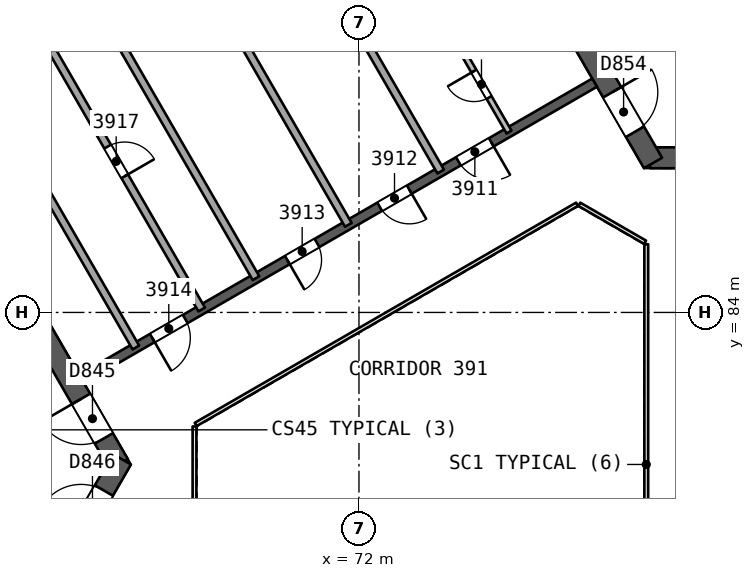
"""IFC4 building model, lengths in metres.
Left out: names, types, materials, properties, quantities, classifications, styles, units other than length and angle.
Written with IfcOpenShell. Run it as: python <this file> out.ifc"""

import sys

from ifc_helpers import new_model, si_unit, direction, frame, frame_2d, origin, place, context, subcontext, project, spatial, rectangle, extrude, element, fill, save


model = new_model("IFC4")
c1 = context("Model", 3, precision=1e-05, world=origin(), true_north=direction((0.0, 1.0)))
c2 = subcontext(c1, "Body", "Model", "MODEL_VIEW")
j1 = project(units=[si_unit("LENGTHUNIT", "METRE"), si_unit("PLANEANGLEUNIT", "RADIAN")], contexts=[c1])
p1 = place(None, origin())
s1 = spatial("IfcSite", under=j1, at=p1, CompositionType="ELEMENT")
p2 = place(p1, origin())
s2 = spatial("IfcBuilding", under=s1, at=p2, CompositionType="ELEMENT")
p3 = place(p2, frame((0.0, 0.0, 163.7)))
s3 = spatial("IfcBuildingStorey", under=s2, at=p3, CompositionType="ELEMENT", Elevation=163.7)
p4 = place(p3, frame((65.682, 80.0, 0.0), z_axis=(0.0, 0.0, 1.0), x_axis=(-0.500000202252, 0.866025287014, 0.0)))
e1 = element("IfcWall", 1, at=p4, inside=s3, PredefinedType="SHEAR", context=c2, shape_type="SweptSolid", body=[
    extrude(rectangle(XDim=10.221, YDim=0.55, at=frame_2d((5.111, 0.0))), origin(), (0.0, 0.0, 1.0), 3.7),
])
p5 = place(p4, frame((0.791, 0.0, 0.0)))
e2 = element("IfcOpeningElement", 2, at=p5, cuts=e1, PredefinedType="OPENING", context=c2, shape_type="SweptSolid", body=[
    extrude(rectangle(XDim=1.2, YDim=2.1, at=frame_2d((0.6, 1.05))), frame((0.0, 0.286, 0.0), z_axis=(0.0, -1.0, 0.0), x_axis=(1.0, 0.0, 0.0)), (0.0, 0.0, 1.0), 0.571),
])
p6 = place(p3, frame((60.709, 71.386, 0.0), z_axis=(0.0, 0.0, 1.0), x_axis=(0.500015938302, 0.866016201606, 0.0)))
e3 = element("IfcWall", 3, at=p6, inside=s3, PredefinedType="SHEAR", context=c2, shape_type="SweptSolid", body=[
    extrude(rectangle(XDim=10.105, YDim=0.55, at=frame_2d((5.053, 0.0))), origin(), (0.0, 0.0, 1.0), 3.7),
])
p7 = place(p6, frame((7.955, 0.0, 0.0)))
e4 = element("IfcOpeningElement", 4, at=p7, cuts=e3, PredefinedType="OPENING", context=c2, shape_type="SweptSolid", body=[
    extrude(rectangle(XDim=1.2, YDim=2.1, at=frame_2d((0.6, 1.05))), frame((0.0, 0.286, 0.0), z_axis=(0.0, -1.0, 0.0), x_axis=(1.0, 0.0, 0.0)), (0.0, 0.0, 1.0), 0.571),
])
p8 = place(p3, frame((79.659, 88.069, 0.0), z_axis=(0.0, 0.0, 1.0), x_axis=(1.0, 0.0, 0.0)))
e5 = element("IfcWall", 5, at=p8, inside=s3, PredefinedType="SHEAR", context=c2, shape_type="SweptSolid", body=[
    extrude(rectangle(XDim=10.221, YDim=0.55, at=frame_2d((5.111, 0.0))), origin(), (0.0, 0.0, 1.0), 3.7),
])
p9 = place(p8, frame((0.791, 0.0, 0.0)))
e6 = element("IfcOpeningElement", 6, at=p9, cuts=e5, PredefinedType="OPENING", context=c2, shape_type="SweptSolid", body=[
    extrude(rectangle(XDim=1.2, YDim=2.1, at=frame_2d((0.6, 1.05))), frame((0.0, 0.286, 0.0), z_axis=(0.0, -1.0, 0.0), x_axis=(1.0, 0.0, 0.0)), (0.0, 0.0, 1.0), 0.571),
])
p10 = place(p3, frame((74.686, 96.683, 0.0), z_axis=(0.0, 0.0, 1.0), x_axis=(0.499997818338, -0.866026663364, 0.0)))
e7 = element("IfcWall", 7, at=p10, inside=s3, PredefinedType="SHEAR", context=c2, shape_type="SweptSolid", body=[
    extrude(rectangle(XDim=10.105, YDim=0.55, at=frame_2d((5.052, 0.0))), origin(), (0.0, 0.0, 1.0), 3.7),
])
p11 = place(p10, frame((7.955, 0.0, 0.0)))
e8 = element("IfcOpeningElement", 8, at=p11, cuts=e7, PredefinedType="OPENING", context=c2, shape_type="SweptSolid", body=[
    extrude(rectangle(XDim=1.2, YDim=2.1, at=frame_2d((0.6, 1.05))), frame((0.0, 0.286, 0.0), z_axis=(0.0, -1.0, 0.0), x_axis=(1.0, 0.0, 0.0)), (0.0, 0.0, 1.0), 0.571),
])
p12 = place(p3, frame((78.2, 90.046, 0.0), z_axis=(0.0, 0.0, 1.0), x_axis=(-0.866026492143, -0.499998114903, 0.0)))
e9 = element("IfcWall", 9, at=p12, inside=s3, PredefinedType="SHEAR", context=c2, shape_type="SweptSolid", body=[
    extrude(rectangle(XDim=15.588, YDim=0.25, at=frame_2d((7.794, 0.0))), origin(), (0.0, 0.0, 1.0), 3.25),
])
p13 = place(p12, frame((3.138, 0.0, 0.0)))
e10 = element("IfcOpeningElement", 10, at=p13, cuts=e9, PredefinedType="OPENING", context=c2, shape_type="SweptSolid", body=[
    extrude(rectangle(XDim=1.0, YDim=2.1, at=frame_2d((0.5, 1.05))), frame((0.0, 0.135, 0.0), z_axis=(0.0, -1.0, 0.0), x_axis=(1.0, 0.0, 0.0)), (0.0, 0.0, 1.0), 0.271),
])
p14 = place(p12, frame((5.629, 0.0, 0.0)))
e11 = element("IfcOpeningElement", 11, at=p14, cuts=e9, PredefinedType="OPENING", context=c2, shape_type="SweptSolid", body=[
    extrude(rectangle(XDim=0.9, YDim=2.1, at=frame_2d((0.45, 1.05))), frame((0.0, 0.135, 0.0), z_axis=(0.0, -1.0, 0.0), x_axis=(1.0, 0.0, 0.0)), (0.0, 0.0, 1.0), 0.271),
])
p15 = place(p12, frame((8.435, 0.0, 0.0)))
e12 = element("IfcOpeningElement", 12, at=p15, cuts=e9, PredefinedType="OPENING", context=c2, shape_type="SweptSolid", body=[
    extrude(rectangle(XDim=0.9, YDim=2.1, at=frame_2d((0.45, 1.05))), frame((0.0, 0.135, 0.0), z_axis=(0.0, -1.0, 0.0), x_axis=(1.0, 0.0, 0.0)), (0.0, 0.0, 1.0), 0.271),
])
p16 = place(p12, frame((12.438, 0.0, 0.0)))
e13 = element("IfcOpeningElement", 13, at=p16, cuts=e9, PredefinedType="OPENING", context=c2, shape_type="SweptSolid", body=[
    extrude(rectangle(XDim=1.0, YDim=2.1, at=frame_2d((0.5, 1.05))), frame((0.0, 0.135, 0.0), z_axis=(0.0, -1.0, 0.0), x_axis=(1.0, 0.0, 0.0)), (0.0, 0.0, 1.0), 0.271),
])
p17 = place(p3, frame((75.948, 88.746, 0.0), z_axis=(0.0, 0.0, 1.0), x_axis=(-0.499987231761, 0.866032775405, 0.0)))
e14 = element("IfcWall", 14, at=p17, inside=s3, PredefinedType="PARTITIONING", context=c2, shape_type="SweptSolid", body=[
    extrude(rectangle(XDim=2.9, YDim=0.15, at=frame_2d((1.45, 0.0))), origin(), (0.0, 0.0, 1.0), 3.25),
])
p18 = place(p17, frame((1.05, 0.0, 0.0)))
e15 = element("IfcOpeningElement", 15, at=p18, cuts=e14, PredefinedType="OPENING", context=c2, shape_type="SweptSolid", body=[
    extrude(rectangle(XDim=0.8, YDim=2.1, at=frame_2d((0.4, 1.05))), frame((0.0, 0.085, 0.0), z_axis=(0.0, -1.0, 0.0), x_axis=(1.0, 0.0, 0.0)), (0.0, 0.0, 1.0), 0.171),
])
for number, where, z_axis, x_axis in (
    (16, (68.374, 97.712, 0.0), (0.0, 0.0, 1.0), (0.5, -0.866, 0.0)),
    (17, (65.944, 96.309, 0.0), (0.0, 0.0, 1.0), (0.5, -0.866, 0.0)),
    (18, (63.514, 94.906, 0.0), (0.0, 0.0, 1.0), (0.5, -0.866, 0.0)),
):
    element("IfcWall", number, at=place(p3, frame(where, z_axis=z_axis, x_axis=x_axis)), inside=s3, PredefinedType="PARTITIONING", context=c2, shape_type="SweptSolid", body=[
        extrude(rectangle(XDim=11.552, YDim=0.2, at=frame_2d((5.776, 0.0))), origin(), (0.0, 0.0, 1.0), 3.25),
    ])
p19 = place(p3, frame((66.129, 83.077, 0.0), z_axis=(0.0, 0.0, 1.0), x_axis=(-0.5000018851, 0.866024315419, 0.0)))
e19 = element("IfcWall", 19, at=p19, inside=s3, PredefinedType="PARTITIONING", context=c2, shape_type="SweptSolid", body=[
    extrude(rectangle(XDim=9.0, YDim=0.2, at=frame_2d((4.5, 0.0))), origin(), (0.0, 0.0, 1.0), 3.25),
])
p20 = place(p3, frame((63.361, 91.871, 0.0), z_axis=(0.0, 0.0, 1.0), x_axis=(0.5000018851, -0.866024315419, 0.0)))
e20 = element("IfcWall", 20, at=p20, inside=s3, PredefinedType="PARTITIONING", context=c2, shape_type="SweptSolid", body=[
    extrude(rectangle(XDim=9.0, YDim=0.2, at=frame_2d((4.5, 0.0))), origin(), (0.0, 0.0, 1.0), 3.25),
])
p21 = place(p20, frame((4.05, 0.0, 0.0)))
e21 = element("IfcOpeningElement", 21, at=p21, cuts=e20, PredefinedType="OPENING", context=c2, shape_type="SweptSolid", body=[
    extrude(rectangle(XDim=0.9, YDim=2.1, at=frame_2d((0.45, 1.05))), frame((0.0, 0.11, 0.0), z_axis=(0.0, -1.0, 0.0), x_axis=(1.0, 0.0, 0.0)), (0.0, 0.0, 1.0), 0.221),
])
p22 = place(p3, frame((42.189, 82.766, 0.0), z_axis=(0.0, 0.0, 1.0), x_axis=(0.866025862562, 0.499999205373, 0.0)))
e22 = element("IfcWall", 22, at=p22, inside=s3, PredefinedType="SOLIDWALL", context=c2, shape_type="SweptSolid", body=[
    extrude(rectangle(XDim=54.064, YDim=0.3, at=frame_2d((27.032, 0.0))), origin(), (0.0, 0.0, 1.0), 3.25),
])
p23 = place(p22, frame((20.688, 0.0, 0.0)))
e23 = element("IfcOpeningElement", 23, at=p23, cuts=e22, PredefinedType="OPENING", context=c2, shape_type="SweptSolid", body=[
    extrude(rectangle(XDim=2.4, YDim=2.4, at=frame_2d((1.2, 1.2))), frame((0.0, 0.161, 0.0), z_axis=(0.0, -1.0, 0.0), x_axis=(1.0, 0.0, 0.0)), (0.0, 0.0, 1.0), 0.321),
])
p24 = place(p22, frame((9.629, 0.0, 0.0)))
e24 = element("IfcOpeningElement", 24, at=p24, cuts=e22, PredefinedType="OPENING", context=c2, shape_type="SweptSolid", body=[
    extrude(rectangle(XDim=2.4, YDim=2.4, at=frame_2d((1.2, 1.2))), frame((0.0, 0.161, 0.0), z_axis=(0.0, -1.0, 0.0), x_axis=(1.0, 0.0, 0.0)), (0.0, 0.0, 1.0), 0.321),
])
p25 = place(p22, frame((40.951, 0.0, 0.0)))
e25 = element("IfcOpeningElement", 25, at=p25, cuts=e22, PredefinedType="OPENING", context=c2, shape_type="SweptSolid", body=[
    extrude(rectangle(XDim=2.4, YDim=2.4, at=frame_2d((1.2, 1.2))), frame((0.0, 0.161, 0.0), z_axis=(0.0, -1.0, 0.0), x_axis=(1.0, 0.0, 0.0)), (0.0, 0.0, 1.0), 0.321),
])
p26 = place(p22, frame((27.847, 0.0, 0.9)))
e26 = element("IfcOpeningElement", 26, at=p26, cuts=e22, PredefinedType="OPENING", context=c2, shape_type="SweptSolid", body=[
    extrude(rectangle(XDim=1.8, YDim=1.5, at=frame_2d((0.9, 0.75))), frame((0.0, 0.161, 0.0), z_axis=(0.0, -1.0, 0.0), x_axis=(1.0, 0.0, 0.0)), (0.0, 0.0, 1.0), 0.321),
])
p27 = place(p22, frame((25.041, 0.0, 0.9)))
e27 = element("IfcOpeningElement", 27, at=p27, cuts=e22, PredefinedType="OPENING", context=c2, shape_type="SweptSolid", body=[
    extrude(rectangle(XDim=1.8, YDim=1.5, at=frame_2d((0.9, 0.75))), frame((0.0, 0.161, 0.0), z_axis=(0.0, -1.0, 0.0), x_axis=(1.0, 0.0, 0.0)), (0.0, 0.0, 1.0), 0.321),
])
p28 = place(p3, frame((86.77, 89.486, 0.0), z_axis=(0.0, 0.0, 1.0), x_axis=(-0.86601811187, 0.500012629753, 0.0)))
e28 = element("IfcWall", 28, at=p28, inside=s3, PredefinedType="SOLIDWALL", context=c2, shape_type="SweptSolid", body=[
    extrude(rectangle(XDim=10.9, YDim=0.2, at=frame_2d((5.45, 0.0))), origin(), (0.0, 0.0, 1.0), 3.25),
])
p29 = place(p28, frame((0.575, 0.0, 0.0)))
e29 = element("IfcOpeningElement", 29, at=p29, cuts=e28, PredefinedType="OPENING", context=c2, shape_type="SweptSolid", body=[
    extrude(rectangle(XDim=1.1, YDim=2.1, at=frame_2d((0.55, 1.05))), frame((0.0, 0.11, 0.0), z_axis=(0.0, -1.0, 0.0), x_axis=(1.0, 0.0, 0.0)), (0.0, 0.0, 1.0), 0.221),
])
p30 = place(p28, frame((2.825, 0.0, 0.0)))
e30 = element("IfcOpeningElement", 30, at=p30, cuts=e28, PredefinedType="OPENING", context=c2, shape_type="SweptSolid", body=[
    extrude(rectangle(XDim=1.1, YDim=2.1, at=frame_2d((0.55, 1.05))), frame((0.0, 0.11, 0.0), z_axis=(0.0, -1.0, 0.0), x_axis=(1.0, 0.0, 0.0)), (0.0, 0.0, 1.0), 0.221),
])
p31 = place(p28, frame((5.075, 0.0, 0.0)))
e31 = element("IfcOpeningElement", 31, at=p31, cuts=e28, PredefinedType="OPENING", context=c2, shape_type="SweptSolid", body=[
    extrude(rectangle(XDim=1.1, YDim=2.1, at=frame_2d((0.55, 1.05))), frame((0.0, 0.11, 0.0), z_axis=(0.0, -1.0, 0.0), x_axis=(1.0, 0.0, 0.0)), (0.0, 0.0, 1.0), 0.221),
])
p32 = place(p28, frame((7.325, 0.0, 0.0)))
e32 = element("IfcOpeningElement", 32, at=p32, cuts=e28, PredefinedType="OPENING", context=c2, shape_type="SweptSolid", body=[
    extrude(rectangle(XDim=1.1, YDim=2.1, at=frame_2d((0.55, 1.05))), frame((0.0, 0.11, 0.0), z_axis=(0.0, -1.0, 0.0), x_axis=(1.0, 0.0, 0.0)), (0.0, 0.0, 1.0), 0.221),
])
p33 = place(p3, frame((89.33, 90.872, 0.0), z_axis=(0.0, 0.0, 1.0), x_axis=(-0.866027589512, 0.49999621419, 0.0)))
e33 = element("IfcWall", 33, at=p33, inside=s3, PredefinedType="SOLIDWALL", context=c2, shape_type="SweptSolid", body=[
    extrude(rectangle(XDim=10.524, YDim=0.2, at=frame_2d((5.262, 0.0))), origin(), (0.0, 0.0, 1.0), 3.25),
])
p34 = place(p33, frame((0.312, 0.0, 0.0)))
e34 = element("IfcOpeningElement", 34, at=p34, cuts=e33, PredefinedType="OPENING", context=c2, shape_type="SweptSolid", body=[
    extrude(rectangle(XDim=0.9, YDim=2.1, at=frame_2d((0.45, 1.05))), frame((0.0, 0.11, 0.0), z_axis=(0.0, -1.0, 0.0), x_axis=(1.0, 0.0, 0.0)), (0.0, 0.0, 1.0), 0.221),
])
p35 = place(p3, frame((79.56, 74.206, 0.0), z_axis=(0.0, 0.0, 1.0), x_axis=(0.0, 1.0, 0.0)))
e35 = element("IfcWall", 35, at=p35, inside=s3, PredefinedType="PARTITIONING", context=c2, shape_type="SweptSolid", body=[
    extrude(rectangle(XDim=11.588, YDim=0.1, at=frame_2d((5.794, 0.0))), origin(), (0.0, 0.0, 1.0), 3.25),
])
p36 = place(p3, frame((79.53, 85.846, 0.0), z_axis=(0.0, 0.0, 1.0), x_axis=(-0.866041268327, 0.499972520799, 0.0)))
e36 = element("IfcWall", 36, at=p36, inside=s3, PredefinedType="PARTITIONING", context=c2, shape_type="SweptSolid", body=[
    extrude(rectangle(XDim=2.0, YDim=0.1, at=frame_2d((1.0, 0.0))), origin(), (0.0, 0.0, 1.0), 3.25),
])
p37 = place(p3, frame((77.738, 86.846, 0.0), z_axis=(0.0, 0.0, 1.0), x_axis=(-0.866026658274, -0.499997827154, 0.0)))
e37 = element("IfcWall", 37, at=p37, inside=s3, PredefinedType="PARTITIONING", context=c2, shape_type="SweptSolid", body=[
    extrude(rectangle(XDim=11.588, YDim=0.1, at=frame_2d((5.794, 0.0))), origin(), (0.0, 0.0, 1.0), 3.25),
])
p38 = place(p3, frame((67.672, 81.0, 0.0), z_axis=(0.0, 0.0, 1.0), x_axis=(0.0, -1.0, 0.0)))
e38 = element("IfcWall", 38, at=p38, inside=s3, PredefinedType="PARTITIONING", context=c2, shape_type="SweptSolid", body=[
    extrude(rectangle(XDim=2.0, YDim=0.1, at=frame_2d((1.0, 0.0))), origin(), (0.0, 0.0, 1.0), 3.25),
])
p39 = place(p18, origin())
e39 = element("IfcDoor", 39, at=p39, inside=s3, OperationType="SINGLE_SWING_RIGHT", PredefinedType="NOTDEFINED", context=c2, shape_type="SweptSolid", body=[
    extrude(rectangle(XDim=0.8, YDim=2.1, at=frame_2d((0.4, 1.05))), frame((0.0, 0.025, 0.0), z_axis=(0.0, -1.0, 0.0), x_axis=(1.0, 0.0, 0.0)), (0.0, 0.0, 1.0), 0.05),
])
fill(e15, e39)
p40 = place(p13, origin())
e40 = element("IfcDoor", 40, at=p40, inside=s3, OperationType="SINGLE_SWING_LEFT", PredefinedType="NOTDEFINED", context=c2, shape_type="SweptSolid", body=[
    extrude(rectangle(XDim=1.0, YDim=2.1, at=frame_2d((0.5, 1.05))), frame((0.0, 0.025, 0.0), z_axis=(0.0, -1.0, 0.0), x_axis=(1.0, 0.0, 0.0)), (0.0, 0.0, 1.0), 0.05),
])
fill(e10, e40)
p41 = place(p14, origin())
e41 = element("IfcDoor", 41, at=p41, inside=s3, OperationType="SINGLE_SWING_LEFT", PredefinedType="NOTDEFINED", context=c2, shape_type="SweptSolid", body=[
    extrude(rectangle(XDim=0.9, YDim=2.1, at=frame_2d((0.45, 1.05))), frame((0.0, 0.025, 0.0), z_axis=(0.0, -1.0, 0.0), x_axis=(1.0, 0.0, 0.0)), (0.0, 0.0, 1.0), 0.05),
])
fill(e11, e41)
p42 = place(p15, origin())
e42 = element("IfcDoor", 42, at=p42, inside=s3, OperationType="SINGLE_SWING_RIGHT", PredefinedType="NOTDEFINED", context=c2, shape_type="SweptSolid", body=[
    extrude(rectangle(XDim=0.9, YDim=2.1, at=frame_2d((0.45, 1.05))), frame((0.0, 0.025, 0.0), z_axis=(0.0, -1.0, 0.0), x_axis=(1.0, 0.0, 0.0)), (0.0, 0.0, 1.0), 0.05),
])
fill(e12, e42)
p43 = place(p16, origin())
e43 = element("IfcDoor", 43, at=p43, inside=s3, OperationType="SINGLE_SWING_RIGHT", PredefinedType="NOTDEFINED", context=c2, shape_type="SweptSolid", body=[
    extrude(rectangle(XDim=1.0, YDim=2.1, at=frame_2d((0.5, 1.05))), frame((0.0, 0.025, 0.0), z_axis=(0.0, -1.0, 0.0), x_axis=(1.0, 0.0, 0.0)), (0.0, 0.0, 1.0), 0.05),
])
fill(e13, e43)
p44 = place(p21, origin())
e44 = element("IfcDoor", 44, at=p44, inside=s3, OperationType="SINGLE_SWING_RIGHT", PredefinedType="NOTDEFINED", context=c2, shape_type="SweptSolid", body=[
    extrude(rectangle(XDim=0.9, YDim=2.1, at=frame_2d((0.45, 1.05))), frame((0.0, 0.025, 0.0), z_axis=(0.0, -1.0, 0.0), x_axis=(1.0, 0.0, 0.0)), (0.0, 0.0, 1.0), 0.05),
])
fill(e21, e44)
p45 = place(p5, origin())
e45 = element("IfcDoor", 45, at=p45, inside=s3, OperationType="SINGLE_SWING_RIGHT", PredefinedType="NOTDEFINED", context=c2, shape_type="SweptSolid", body=[
    extrude(rectangle(XDim=1.2, YDim=2.1, at=frame_2d((0.6, 1.05))), frame((0.0, 0.025, 0.0), z_axis=(0.0, -1.0, 0.0), x_axis=(1.0, 0.0, 0.0)), (0.0, 0.0, 1.0), 0.05),
])
fill(e2, e45)
p46 = place(p7, origin())
e46 = element("IfcDoor", 46, at=p46, inside=s3, OperationType="SINGLE_SWING_LEFT", PredefinedType="NOTDEFINED", context=c2, shape_type="SweptSolid", body=[
    extrude(rectangle(XDim=1.2, YDim=2.1, at=frame_2d((0.6, 1.05))), frame((0.0, 0.025, 0.0), z_axis=(0.0, -1.0, 0.0), x_axis=(1.0, 0.0, 0.0)), (0.0, 0.0, 1.0), 0.05),
])
fill(e4, e46)
p47 = place(p11, origin())
e47 = element("IfcDoor", 47, at=p47, inside=s3, OperationType="SINGLE_SWING_LEFT", PredefinedType="NOTDEFINED", context=c2, shape_type="SweptSolid", body=[
    extrude(rectangle(XDim=1.2, YDim=2.1, at=frame_2d((0.6, 1.05))), frame((0.0, 0.025, 0.0), z_axis=(0.0, -1.0, 0.0), x_axis=(1.0, 0.0, 0.0)), (0.0, 0.0, 1.0), 0.05),
])
fill(e8, e47)
save(model, sys.argv[1])
